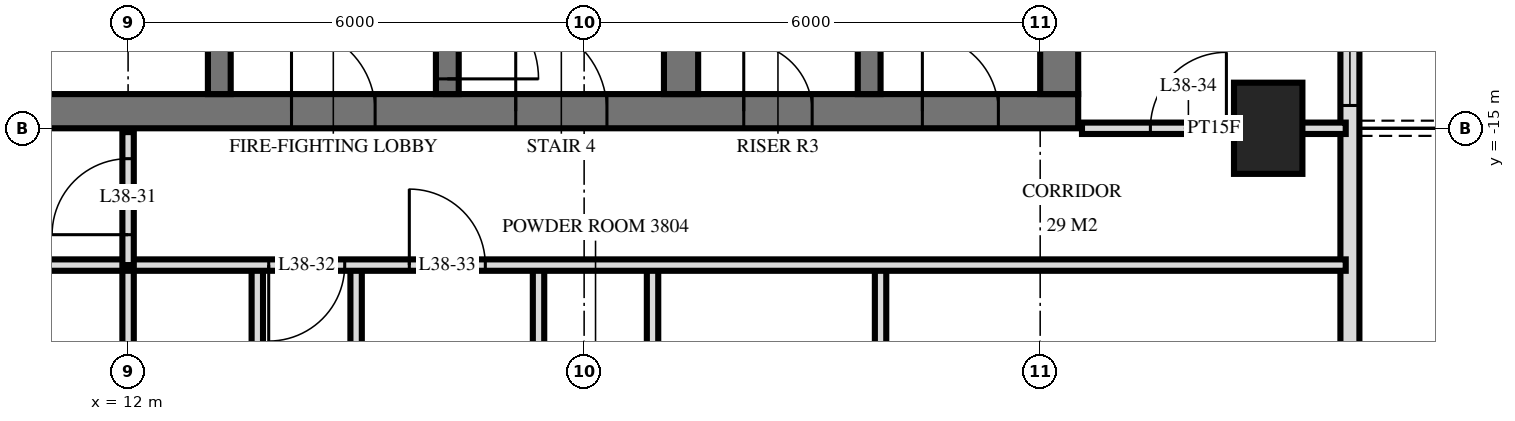
"""IFC4 building model, lengths in metres.
Left out: names, types, materials, properties, quantities, classifications, styles, units other than length and angle.
Written with IfcOpenShell. Run it as: python <this file> out.ifc"""

import sys

from ifc_helpers import new_model, si_unit, direction, frame, frame_2d, origin, origin_2d, place, context, subcontext, project, spatial, rectangle, extrude, element, fill, save


model = new_model("IFC4")
c1 = context("Model", 3, precision=1e-05, world=origin(), true_north=direction((0.0, 1.0)))
c2 = subcontext(c1, "Body", "Model", "MODEL_VIEW")
j1 = project(units=[si_unit("LENGTHUNIT", "METRE"), si_unit("PLANEANGLEUNIT", "RADIAN")], contexts=[c1])
p1 = place(None, origin())
s1 = spatial("IfcSite", under=j1, at=p1, CompositionType="ELEMENT")
p2 = place(p1, origin())
s2 = spatial("IfcBuilding", under=s1, at=p2, CompositionType="ELEMENT")
p3 = place(p2, frame((0.0, 0.0, 148.8)))
s3 = spatial("IfcBuildingStorey", under=s2, at=p3, CompositionType="ELEMENT", Elevation=148.8)
p4 = place(p3, frame((27.0, -15.0, 0.0), z_axis=(0.0, 0.0, 1.0), x_axis=(0.0, 1.0, 0.0)))
e1 = element("IfcColumn", 1, at=p4, inside=s3, PredefinedType="COLUMN", context=c2, shape_type="SweptSolid", body=[
    extrude(rectangle(XDim=1.2, YDim=0.9, at=origin_2d()), origin(), (0.0, 0.0, 1.0), 3.6),
])
p5 = place(p3, frame((10.0, -14.775, 0.0), z_axis=(0.0, 0.0, 1.0), x_axis=(1.0, 0.0, 0.0)))
e2 = element("IfcWall", 2, at=p5, inside=s3, PredefinedType="SHEAR", context=c2, shape_type="SweptSolid", body=[
    extrude(rectangle(XDim=14.5, YDim=0.45, at=frame_2d((7.25, 0.0))), origin(), (0.0, 0.0, 1.0), 3.6),
])
p6 = place(p5, frame((7.1, 0.0, 0.0)))
e3 = element("IfcOpeningElement", 3, at=p6, cuts=e2, PredefinedType="OPENING", context=c2, shape_type="SweptSolid", body=[
    extrude(rectangle(XDim=1.2, YDim=2.1, at=frame_2d((0.6, 1.05))), frame((0.0, 0.235, 0.0), z_axis=(0.0, -1.0, 0.0), x_axis=(1.0, 0.0, 0.0)), (0.0, 0.0, 1.0), 0.47),
])
p7 = place(p5, frame((4.15, 0.0, 0.0)))
e4 = element("IfcOpeningElement", 4, at=p7, cuts=e2, PredefinedType="OPENING", context=c2, shape_type="SweptSolid", body=[
    extrude(rectangle(XDim=1.1, YDim=2.1, at=frame_2d((0.55, 1.05))), frame((0.0, 0.235, 0.0), z_axis=(0.0, -1.0, 0.0), x_axis=(1.0, 0.0, 0.0)), (0.0, 0.0, 1.0), 0.47),
])
p8 = place(p5, frame((10.1, 0.0, 0.0)))
e5 = element("IfcOpeningElement", 5, at=p8, cuts=e2, PredefinedType="OPENING", context=c2, shape_type="SweptSolid", body=[
    extrude(rectangle(XDim=0.9, YDim=2.1, at=frame_2d((0.45, 1.05))), frame((0.0, 0.235, 0.0), z_axis=(0.0, -1.0, 0.0), x_axis=(1.0, 0.0, 0.0)), (0.0, 0.0, 1.0), 0.47),
])
p9 = place(p5, frame((12.45, 0.0, 0.0)))
e6 = element("IfcOpeningElement", 6, at=p9, cuts=e2, PredefinedType="OPENING", context=c2, shape_type="SweptSolid", body=[
    extrude(rectangle(XDim=1.0, YDim=2.1, at=frame_2d((0.5, 1.05))), frame((0.0, 0.235, 0.0), z_axis=(0.0, -1.0, 0.0), x_axis=(1.0, 0.0, 0.0)), (0.0, 0.0, 1.0), 0.47),
])
p10 = place(p3, frame((24.25, -14.55, 0.0), z_axis=(0.0, 0.0, 1.0), x_axis=(0.0, 1.0, 0.0)))
e7 = element("IfcWall", 7, at=p10, inside=s3, PredefinedType="SHEAR", context=c2, shape_type="SweptSolid", body=[
    extrude(rectangle(XDim=14.1, YDim=0.5, at=frame_2d((7.05, 0.0))), origin(), (0.0, 0.0, 1.0), 3.6),
])
p11 = place(p3, frame((13.2, -14.55, 0.0), z_axis=(0.0, 0.0, 1.0), x_axis=(0.0, 1.0, 0.0)))
e8 = element("IfcWall", 8, at=p11, inside=s3, PredefinedType="SHEAR", context=c2, shape_type="SweptSolid", body=[
    extrude(rectangle(XDim=5.4, YDim=0.3, at=frame_2d((2.7, 0.0))), origin(), (0.0, 0.0, 1.0), 3.6),
])
p12 = place(p11, frame((4.0, 0.0, 0.0)))
e9 = element("IfcOpeningElement", 9, at=p12, cuts=e8, PredefinedType="OPENING", context=c2, shape_type="SweptSolid", body=[
    extrude(rectangle(XDim=1.2, YDim=2.1, at=frame_2d((0.6, 1.05))), frame((0.0, 0.16, 0.0), z_axis=(0.0, -1.0, 0.0), x_axis=(1.0, 0.0, 0.0)), (0.0, 0.0, 1.0), 0.32),
])
p13 = place(p3, frame((16.2, -14.55, 0.0), z_axis=(0.0, 0.0, 1.0), x_axis=(0.0, 1.0, 0.0)))
e10 = element("IfcWall", 10, at=p13, inside=s3, PredefinedType="SHEAR", context=c2, shape_type="SweptSolid", body=[
    extrude(rectangle(XDim=5.4, YDim=0.3, at=frame_2d((2.7, 0.0))), origin(), (0.0, 0.0, 1.0), 3.6),
])
p14 = place(p13, frame((0.2, 0.0, 0.0)))
e11 = element("IfcOpeningElement", 11, at=p14, cuts=e10, PredefinedType="OPENING", context=c2, shape_type="SweptSolid", body=[
    extrude(rectangle(XDim=1.2, YDim=2.1, at=frame_2d((0.6, 1.05))), frame((0.0, 0.16, 0.0), z_axis=(0.0, -1.0, 0.0), x_axis=(1.0, 0.0, 0.0)), (0.0, 0.0, 1.0), 0.32),
])
p15 = place(p3, frame((19.275, -14.55, 0.0), z_axis=(0.0, 0.0, 1.0), x_axis=(0.0, 1.0, 0.0)))
e12 = element("IfcWall", 12, at=p15, inside=s3, PredefinedType="SHEAR", context=c2, shape_type="SweptSolid", body=[
    extrude(rectangle(XDim=5.4, YDim=0.45, at=frame_2d((2.7, 0.0))), origin(), (0.0, 0.0, 1.0), 3.6),
])
p16 = place(p3, frame((21.75, -14.55, 0.0), z_axis=(0.0, 0.0, 1.0), x_axis=(0.0, 1.0, 0.0)))
e13 = element("IfcWall", 13, at=p16, inside=s3, PredefinedType="SHEAR", context=c2, shape_type="SweptSolid", body=[
    extrude(rectangle(XDim=5.4, YDim=0.3, at=frame_2d((2.7, 0.0))), origin(), (0.0, 0.0, 1.0), 3.6),
])
p17 = place(p3, frame((28.075, -29.275, 0.0), z_axis=(0.0, 0.0, 1.0), x_axis=(0.0, 1.0, 0.0)))
e14 = element("IfcWall", 14, at=p17, inside=s3, PredefinedType="SOLIDWALL", context=c2, shape_type="SweptSolid", body=[
    extrude(rectangle(XDim=25.951, YDim=0.25, at=frame_2d((12.975, 0.0))), origin(), (0.0, 0.0, 1.0), 3.32),
])
p18 = place(p17, frame((0.575, 0.0, 0.0)))
e15 = element("IfcOpeningElement", 15, at=p18, cuts=e14, PredefinedType="OPENING", context=c2, shape_type="SweptSolid", body=[
    extrude(rectangle(XDim=1.8, YDim=2.4, at=frame_2d((0.9, 1.2))), frame((0.0, 0.135, 0.0), z_axis=(0.0, -1.0, 0.0), x_axis=(1.0, 0.0, 0.0)), (0.0, 0.0, 1.0), 0.27),
])
p19 = place(p17, frame((3.325, 0.0, 0.3)))
e16 = element("IfcOpeningElement", 16, at=p19, cuts=e14, PredefinedType="OPENING", context=c2, shape_type="SweptSolid", body=[
    extrude(rectangle(XDim=1.8, YDim=2.1, at=frame_2d((0.9, 1.05))), frame((0.0, 0.135, 0.0), z_axis=(0.0, -1.0, 0.0), x_axis=(1.0, 0.0, 0.0)), (0.0, 0.0, 1.0), 0.27),
])
p20 = place(p17, frame((9.475, 0.0, 0.0)))
e17 = element("IfcOpeningElement", 17, at=p20, cuts=e14, PredefinedType="OPENING", context=c2, shape_type="SweptSolid", body=[
    extrude(rectangle(XDim=1.8, YDim=2.4, at=frame_2d((0.9, 1.2))), frame((0.0, 0.135, 0.0), z_axis=(0.0, -1.0, 0.0), x_axis=(1.0, 0.0, 0.0)), (0.0, 0.0, 1.0), 0.27),
])
p21 = place(p17, frame((14.575, 0.0, 0.3)))
e18 = element("IfcOpeningElement", 18, at=p21, cuts=e14, PredefinedType="OPENING", context=c2, shape_type="SweptSolid", body=[
    extrude(rectangle(XDim=2.4, YDim=2.1, at=frame_2d((1.2, 1.05))), frame((0.0, 0.135, 0.0), z_axis=(0.0, -1.0, 0.0), x_axis=(1.0, 0.0, 0.0)), (0.0, 0.0, 1.0), 0.27),
])
p22 = place(p17, frame((17.875, 0.0, 0.0)))
e19 = element("IfcOpeningElement", 19, at=p22, cuts=e14, PredefinedType="OPENING", context=c2, shape_type="SweptSolid", body=[
    extrude(rectangle(XDim=1.8, YDim=2.4, at=frame_2d((0.9, 1.2))), frame((0.0, 0.135, 0.0), z_axis=(0.0, -1.0, 0.0), x_axis=(1.0, 0.0, 0.0)), (0.0, 0.0, 1.0), 0.27),
])
p23 = place(p3, frame((21.9, -21.0, 0.0), z_axis=(0.0, 0.0, 1.0), x_axis=(0.0, 1.0, 0.0)))
e20 = element("IfcWall", 20, at=p23, inside=s3, PredefinedType="PARTITIONING", context=c2, shape_type="SweptSolid", body=[
    extrude(rectangle(XDim=4.2, YDim=0.15, at=frame_2d((2.1, 0.0))), origin(), (0.0, 0.0, 1.0), 3.32),
])
p24 = place(p3, frame((18.9, -21.0, 0.0), z_axis=(0.0, 0.0, 1.0), x_axis=(0.0, 1.0, 0.0)))
e21 = element("IfcWall", 21, at=p24, inside=s3, PredefinedType="PLUMBINGWALL", context=c2, shape_type="SweptSolid", body=[
    extrude(rectangle(XDim=4.2, YDim=0.15, at=frame_2d((2.1, 0.0))), origin(), (0.0, 0.0, 1.0), 3.32),
])
p25 = place(p3, frame((17.4, -21.0, 0.0), z_axis=(0.0, 0.0, 1.0), x_axis=(0.0, 1.0, 0.0)))
e22 = element("IfcWall", 22, at=p25, inside=s3, PredefinedType="PARTITIONING", context=c2, shape_type="SweptSolid", body=[
    extrude(rectangle(XDim=4.2, YDim=0.15, at=frame_2d((2.1, 0.0))), origin(), (0.0, 0.0, 1.0), 3.32),
])
p26 = place(p25, frame((1.6, 0.0, 0.0)))
e23 = element("IfcOpeningElement", 23, at=p26, cuts=e22, PredefinedType="OPENING", context=c2, shape_type="SweptSolid", body=[
    extrude(rectangle(XDim=1.0, YDim=2.1, at=frame_2d((0.5, 1.05))), frame((0.0, 0.085, 0.0), z_axis=(0.0, -1.0, 0.0), x_axis=(1.0, 0.0, 0.0)), (0.0, 0.0, 1.0), 0.17),
])
p27 = place(p3, frame((15.0, -21.0, 0.0), z_axis=(0.0, 0.0, 1.0), x_axis=(0.0, 1.0, 0.0)))
e24 = element("IfcWall", 24, at=p27, inside=s3, PredefinedType="PARTITIONING", context=c2, shape_type="SweptSolid", body=[
    extrude(rectangle(XDim=4.2, YDim=0.15, at=frame_2d((2.1, 0.0))), origin(), (0.0, 0.0, 1.0), 3.32),
])
p28 = place(p3, frame((13.7, -21.8, 0.0), z_axis=(0.0, 0.0, 1.0), x_axis=(0.0, 1.0, 0.0)))
e25 = element("IfcWall", 25, at=p28, inside=s3, PredefinedType="PARTITIONING", context=c2, shape_type="SweptSolid", body=[
    extrude(rectangle(XDim=5.0, YDim=0.15, at=frame_2d((2.5, 0.0))), origin(), (0.0, 0.0, 1.0), 3.32),
])
p29 = place(p28, frame((2.1, 0.0, 0.0)))
e26 = element("IfcOpeningElement", 26, at=p29, cuts=e25, PredefinedType="OPENING", context=c2, shape_type="SweptSolid", body=[
    extrude(rectangle(XDim=0.8, YDim=2.1, at=frame_2d((0.4, 1.05))), frame((0.0, 0.085, 0.0), z_axis=(0.0, -1.0, 0.0), x_axis=(1.0, 0.0, 0.0)), (0.0, 0.0, 1.0), 0.17),
])
p30 = place(p3, frame((12.0, -16.8, 0.0), z_axis=(0.0, 0.0, 1.0), x_axis=(0.0, 1.0, 0.0)))
e27 = element("IfcWall", 27, at=p30, inside=s3, PredefinedType="PARTITIONING", context=c2, shape_type="SweptSolid", body=[
    extrude(rectangle(XDim=1.75, YDim=0.15, at=frame_2d((0.875, 0.0))), origin(), (0.0, 0.0, 1.0), 3.32),
])
p31 = place(p30, frame((0.4, 0.0, 0.0)))
e28 = element("IfcOpeningElement", 28, at=p31, cuts=e27, PredefinedType="OPENING", context=c2, shape_type="SweptSolid", body=[
    extrude(rectangle(XDim=1.0, YDim=2.1, at=frame_2d((0.5, 1.05))), frame((0.0, 0.085, 0.0), z_axis=(0.0, -1.0, 0.0), x_axis=(1.0, 0.0, 0.0)), (0.0, 0.0, 1.0), 0.17),
])
p32 = place(p3, frame((12.0, -33.62, 0.0), z_axis=(0.0, 0.0, 1.0), x_axis=(0.0, 1.0, 0.0)))
e29 = element("IfcWall", 29, at=p32, inside=s3, PredefinedType="PARTITIONING", context=c2, shape_type="SweptSolid", body=[
    extrude(rectangle(XDim=16.82, YDim=0.15, at=frame_2d((8.41, 0.0))), origin(), (0.0, 0.0, 1.0), 3.32),
])
p33 = place(p3, frame((-28.02, -16.8, 0.0), z_axis=(0.0, 0.0, 1.0), x_axis=(1.0, 0.0, 0.0)))
e30 = element("IfcWall", 30, at=p33, inside=s3, PredefinedType="PARTITIONING", context=c2, shape_type="SweptSolid", body=[
    extrude(rectangle(XDim=56.04, YDim=0.15, at=frame_2d((28.02, 0.0))), origin(), (0.0, 0.0, 1.0), 3.32),
])
p34 = place(p33, frame((13.17, 0.0, 0.0)))
e31 = element("IfcOpeningElement", 31, at=p34, cuts=e30, PredefinedType="OPENING", context=c2, shape_type="SweptSolid", body=[
    extrude(rectangle(XDim=1.0, YDim=2.1, at=frame_2d((0.5, 1.05))), frame((0.0, 0.085, 0.0), z_axis=(0.0, -1.0, 0.0), x_axis=(1.0, 0.0, 0.0)), (0.0, 0.0, 1.0), 0.17),
])
p35 = place(p33, frame((11.32, 0.0, 0.0)))
e32 = element("IfcOpeningElement", 32, at=p35, cuts=e30, PredefinedType="OPENING", context=c2, shape_type="SweptSolid", body=[
    extrude(rectangle(XDim=1.0, YDim=2.1, at=frame_2d((0.5, 1.05))), frame((0.0, 0.085, 0.0), z_axis=(0.0, -1.0, 0.0), x_axis=(1.0, 0.0, 0.0)), (0.0, 0.0, 1.0), 0.17),
])
p36 = place(p33, frame((41.87, 0.0, 0.0)))
e33 = element("IfcOpeningElement", 33, at=p36, cuts=e30, PredefinedType="OPENING", context=c2, shape_type="SweptSolid", body=[
    extrude(rectangle(XDim=1.0, YDim=2.1, at=frame_2d((0.5, 1.05))), frame((0.0, 0.085, 0.0), z_axis=(0.0, -1.0, 0.0), x_axis=(1.0, 0.0, 0.0)), (0.0, 0.0, 1.0), 0.17),
])
p37 = place(p33, frame((43.72, 0.0, 0.0)))
e34 = element("IfcOpeningElement", 34, at=p37, cuts=e30, PredefinedType="OPENING", context=c2, shape_type="SweptSolid", body=[
    extrude(rectangle(XDim=1.0, YDim=2.1, at=frame_2d((0.5, 1.05))), frame((0.0, 0.085, 0.0), z_axis=(0.0, -1.0, 0.0), x_axis=(1.0, 0.0, 0.0)), (0.0, 0.0, 1.0), 0.17),
])
p38 = place(p33, frame((19.52, 0.0, 0.0)))
e35 = element("IfcOpeningElement", 35, at=p38, cuts=e30, PredefinedType="OPENING", context=c2, shape_type="SweptSolid", body=[
    extrude(rectangle(XDim=1.0, YDim=2.1, at=frame_2d((0.5, 1.05))), frame((0.0, 0.085, 0.0), z_axis=(0.0, -1.0, 0.0), x_axis=(1.0, 0.0, 0.0)), (0.0, 0.0, 1.0), 0.17),
])
p39 = place(p33, frame((27.52, 0.0, 0.0)))
e36 = element("IfcOpeningElement", 36, at=p39, cuts=e30, PredefinedType="OPENING", context=c2, shape_type="SweptSolid", body=[
    extrude(rectangle(XDim=1.0, YDim=2.1, at=frame_2d((0.5, 1.05))), frame((0.0, 0.085, 0.0), z_axis=(0.0, -1.0, 0.0), x_axis=(1.0, 0.0, 0.0)), (0.0, 0.0, 1.0), 0.17),
])
p40 = place(p33, frame((35.52, 0.0, 0.0)))
e37 = element("IfcOpeningElement", 37, at=p40, cuts=e30, PredefinedType="OPENING", context=c2, shape_type="SweptSolid", body=[
    extrude(rectangle(XDim=1.0, YDim=2.1, at=frame_2d((0.5, 1.05))), frame((0.0, 0.085, 0.0), z_axis=(0.0, -1.0, 0.0), x_axis=(1.0, 0.0, 0.0)), (0.0, 0.0, 1.0), 0.17),
])
p41 = place(p3, frame((24.55, -15.0, 0.0), z_axis=(0.0, 0.0, 1.0), x_axis=(1.0, 0.0, 0.0)))
e38 = element("IfcWall", 38, at=p41, inside=s3, PredefinedType="PARTITIONING", context=c2, shape_type="SweptSolid", body=[
    extrude(rectangle(XDim=3.47, YDim=0.15, at=frame_2d((1.735, 0.0))), origin(), (0.0, 0.0, 1.0), 3.32),
])
p42 = place(p41, frame((0.9, 0.0, 0.0)))
e39 = element("IfcOpeningElement", 39, at=p42, cuts=e38, PredefinedType="OPENING", context=c2, shape_type="SweptSolid", body=[
    extrude(rectangle(XDim=1.0, YDim=2.1, at=frame_2d((0.5, 1.05))), frame((0.0, 0.085, 0.0), z_axis=(0.0, -1.0, 0.0), x_axis=(1.0, 0.0, 0.0)), (0.0, 0.0, 1.0), 0.17),
])
p43 = place(p21, origin())
e40 = element("IfcWindow", 40, at=p43, inside=s3, PartitioningType="SINGLE_PANEL", PredefinedType="WINDOW", context=c2, shape_type="SweptSolid", body=[
    extrude(rectangle(XDim=2.4, YDim=2.1, at=frame_2d((1.2, 1.05))), frame((0.0, 0.03, 0.0), z_axis=(0.0, -1.0, 0.0), x_axis=(1.0, 0.0, 0.0)), (0.0, 0.0, 1.0), 0.06),
])
fill(e18, e40)
p44 = place(p6, origin())
e41 = element("IfcDoor", 41, at=p44, inside=s3, OperationType="SINGLE_SWING_RIGHT", PredefinedType="DOOR", context=c2, shape_type="SweptSolid", body=[
    extrude(rectangle(XDim=1.2, YDim=2.1, at=frame_2d((0.6, 1.05))), frame((0.0, 0.025, 0.0), z_axis=(0.0, -1.0, 0.0), x_axis=(1.0, 0.0, 0.0)), (0.0, 0.0, 1.0), 0.05),
])
fill(e3, e41)
p45 = place(p7, origin())
e42 = element("IfcDoor", 42, at=p45, inside=s3, OperationType="SINGLE_SWING_RIGHT", PredefinedType="DOOR", context=c2, shape_type="SweptSolid", body=[
    extrude(rectangle(XDim=1.1, YDim=2.1, at=frame_2d((0.55, 1.05))), frame((0.0, 0.025, 0.0), z_axis=(0.0, -1.0, 0.0), x_axis=(1.0, 0.0, 0.0)), (0.0, 0.0, 1.0), 0.05),
])
fill(e4, e42)
p46 = place(p8, origin())
e43 = element("IfcDoor", 43, at=p46, inside=s3, OperationType="SINGLE_SWING_RIGHT", PredefinedType="DOOR", context=c2, shape_type="SweptSolid", body=[
    extrude(rectangle(XDim=0.9, YDim=2.1, at=frame_2d((0.45, 1.05))), frame((0.0, 0.025, 0.0), z_axis=(0.0, -1.0, 0.0), x_axis=(1.0, 0.0, 0.0)), (0.0, 0.0, 1.0), 0.05),
])
fill(e5, e43)
p47 = place(p9, origin())
e44 = element("IfcDoor", 44, at=p47, inside=s3, OperationType="SINGLE_SWING_RIGHT", PredefinedType="DOOR", context=c2, shape_type="SweptSolid", body=[
    extrude(rectangle(XDim=1.0, YDim=2.1, at=frame_2d((0.5, 1.05))), frame((0.0, 0.025, 0.0), z_axis=(0.0, -1.0, 0.0), x_axis=(1.0, 0.0, 0.0)), (0.0, 0.0, 1.0), 0.05),
])
fill(e6, e44)
p48 = place(p14, frame((0.6, 0.0, 0.0), z_axis=(0.0, 0.0, 1.0), x_axis=(-1.0, 0.0, 0.0)))
e45 = element("IfcDoor", 45, at=p48, inside=s3, OperationType="SINGLE_SWING_LEFT", PredefinedType="DOOR", context=c2, shape_type="SweptSolid", body=[
    extrude(rectangle(XDim=1.2, YDim=2.1, at=frame_2d((0.0, 1.05))), frame((0.0, -0.025, 0.0), z_axis=(0.0, 1.0, 0.0), x_axis=(-1.0, 0.0, 0.0)), (0.0, 0.0, 1.0), 0.05),
])
fill(e11, e45)
p49 = place(p31, origin())
e46 = element("IfcDoor", 46, at=p49, inside=s3, OperationType="SINGLE_SWING_RIGHT", PredefinedType="DOOR", context=c2, shape_type="SweptSolid", body=[
    extrude(rectangle(XDim=1.0, YDim=2.1, at=frame_2d((0.5, 1.05))), frame((0.0, 0.025, 0.0), z_axis=(0.0, -1.0, 0.0), x_axis=(1.0, 0.0, 0.0)), (0.0, 0.0, 1.0), 0.05),
])
fill(e28, e46)
p50 = place(p36, frame((0.5, 0.0, 0.0), z_axis=(0.0, 0.0, 1.0), x_axis=(-1.0, 0.0, 0.0)))
e47 = element("IfcDoor", 47, at=p50, inside=s3, OperationType="SINGLE_SWING_LEFT", PredefinedType="DOOR", context=c2, shape_type="SweptSolid", body=[
    extrude(rectangle(XDim=1.0, YDim=2.1, at=frame_2d((0.0, 1.05))), frame((0.0, -0.025, 0.0), z_axis=(0.0, 1.0, 0.0), x_axis=(-1.0, 0.0, 0.0)), (0.0, 0.0, 1.0), 0.05),
])
fill(e33, e47)
p51 = place(p37, origin())
e48 = element("IfcDoor", 48, at=p51, inside=s3, OperationType="SINGLE_SWING_RIGHT", PredefinedType="DOOR", context=c2, shape_type="SweptSolid", body=[
    extrude(rectangle(XDim=1.0, YDim=2.1, at=frame_2d((0.5, 1.05))), frame((0.0, 0.025, 0.0), z_axis=(0.0, -1.0, 0.0), x_axis=(1.0, 0.0, 0.0)), (0.0, 0.0, 1.0), 0.05),
])
fill(e34, e48)
p52 = place(p42, origin())
e49 = element("IfcDoor", 49, at=p52, inside=s3, OperationType="SINGLE_SWING_LEFT", PredefinedType="DOOR", context=c2, shape_type="SweptSolid", body=[
    extrude(rectangle(XDim=1.0, YDim=2.1, at=frame_2d((0.5, 1.05))), frame((0.0, 0.025, 0.0), z_axis=(0.0, -1.0, 0.0), x_axis=(1.0, 0.0, 0.0)), (0.0, 0.0, 1.0), 0.05),
])
fill(e39, e49)
save(model, sys.argv[1])
